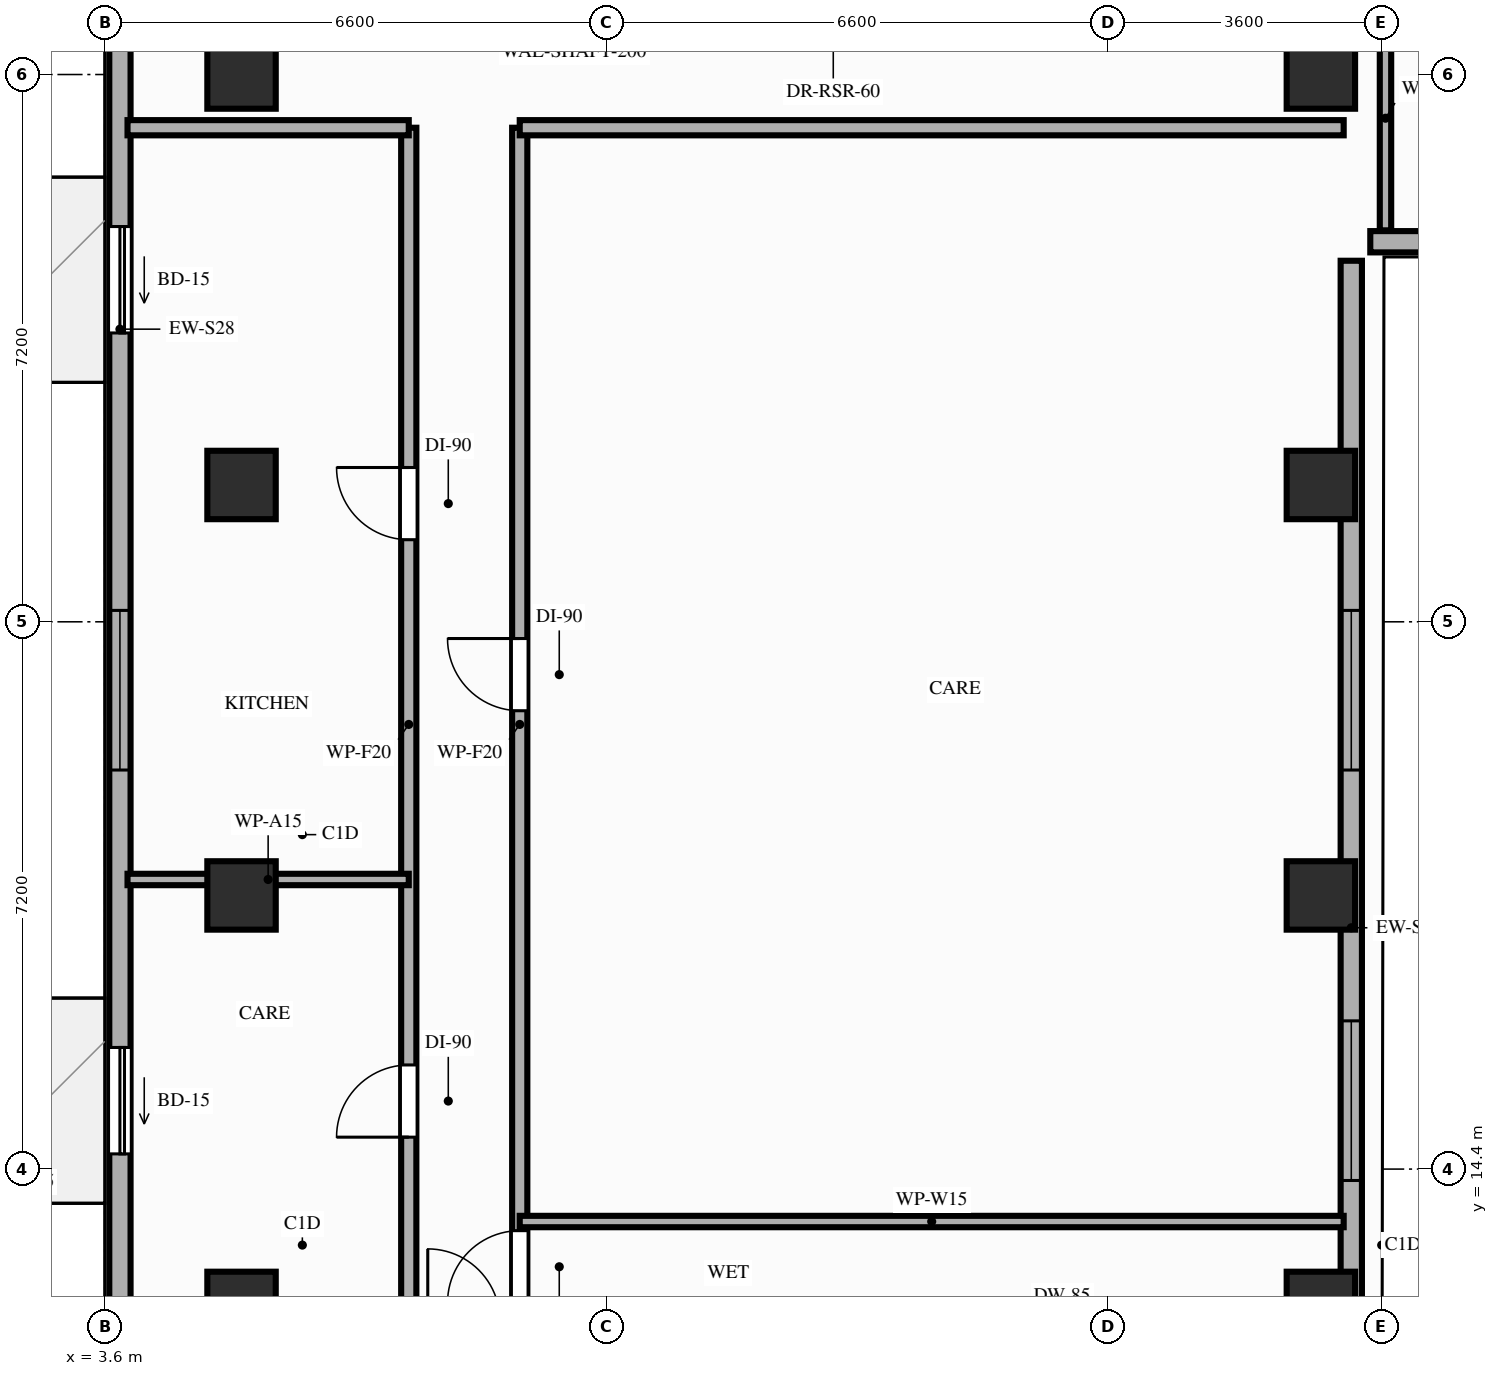
"""IFC4 building model, lengths in metres.
Left out: names, types, materials, properties, quantities, classifications, styles, units other than length and angle.
Written with IfcOpenShell. Run it as: python <this file> out.ifc"""

import sys

from ifc_helpers import new_model, si_unit, direction, frame, frame_2d, origin, origin_2d, place, context, subcontext, project, spatial, rectangle, extrude, element, fill, save


model = new_model("IFC4")
c1 = context("Model", 3, precision=1e-05, world=origin(), true_north=direction((0.0, 1.0)))
c2 = subcontext(c1, "Body", "Model", "MODEL_VIEW")
j1 = project(units=[si_unit("LENGTHUNIT", "METRE"), si_unit("PLANEANGLEUNIT", "RADIAN")], contexts=[c1])
p1 = place(None, origin())
s1 = spatial("IfcSite", under=j1, at=p1, CompositionType="ELEMENT")
p2 = place(p1, origin())
s2 = spatial("IfcBuilding", under=s1, at=p2, CompositionType="ELEMENT")
p3 = place(p2, frame((0.0, 0.0, 192.0)))
s3 = spatial("IfcBuildingStorey", under=s2, at=p3, CompositionType="ELEMENT", Elevation=192.0)
for number, where, z_axis, x_axis in (
    (1, (5.4, 12.6, 0.0), (0.0, 0.0, 1.0), (1.0, 0.0, 0.0)),
    (2, (19.6, 12.6, 0.0), (0.0, 0.0, 1.0), (1.0, 0.0, 0.0)),
    (3, (5.4, 18.0, 0.0), (0.0, 0.0, 1.0), (1.0, 0.0, 0.0)),
    (4, (19.6, 18.0, 0.0), (0.0, 0.0, 1.0), (1.0, 0.0, 0.0)),
    (5, (5.4, 23.4, 0.0), (0.0, 0.0, 1.0), (1.0, 0.0, 0.0)),
    (6, (19.6, 23.4, 0.0), (0.0, 0.0, 1.0), (1.0, 0.0, 0.0)),
    (7, (5.4, 28.8, 0.0), (0.0, 0.0, 1.0), (1.0, 0.0, 0.0)),
    (8, (19.6, 28.8, 0.0), (0.0, 0.0, 1.0), (1.0, 0.0, 0.0)),
):
    element("IfcColumn", number, at=place(p3, frame(where, z_axis=z_axis, x_axis=x_axis)), inside=s3, PredefinedType="COLUMN", context=c2, shape_type="SweptSolid", body=[
        extrude(rectangle(XDim=0.9, YDim=0.9, at=origin_2d()), origin(), (0.0, 0.0, 1.0), 3.2),
    ])
p4 = place(p3, frame((3.8, 42.1, 0.0), z_axis=(0.0, 0.0, 1.0), x_axis=(0.0, -1.0, 0.0)))
e9 = element("IfcWall", 9, at=p4, inside=s3, PredefinedType="STANDARD", context=c2, shape_type="SweptSolid", body=[
    extrude(rectangle(XDim=33.3, YDim=0.28, at=frame_2d((16.65, 0.0))), origin(), (0.0, 0.0, 1.0), 2.71),
])
p5 = place(p4, frame((26.1, 0.0, 0.0)))
e10 = element("IfcOpeningElement", 10, at=p5, cuts=e9, PredefinedType="OPENING", context=c2, shape_type="SweptSolid", body=[
    extrude(rectangle(XDim=1.4, YDim=2.1, at=frame_2d((0.7, 1.05))), frame((0.0, 0.15, 0.0), z_axis=(0.0, -1.0, 0.0), x_axis=(1.0, 0.0, 0.0)), (0.0, 0.0, 1.0), 0.3),
])
p6 = place(p4, frame((15.3, 0.0, 0.0)))
e11 = element("IfcOpeningElement", 11, at=p6, cuts=e9, PredefinedType="OPENING", context=c2, shape_type="SweptSolid", body=[
    extrude(rectangle(XDim=1.4, YDim=2.1, at=frame_2d((0.7, 1.05))), frame((0.0, 0.15, 0.0), z_axis=(0.0, -1.0, 0.0), x_axis=(1.0, 0.0, 0.0)), (0.0, 0.0, 1.0), 0.3),
])
p7 = place(p4, frame((30.38, 0.0, 0.85)))
e12 = element("IfcOpeningElement", 12, at=p7, cuts=e9, PredefinedType="OPENING", context=c2, shape_type="SweptSolid", body=[
    extrude(rectangle(XDim=2.1, YDim=1.61, at=frame_2d((1.05, 0.805))), frame((0.0, 0.15, 0.0), z_axis=(0.0, -1.0, 0.0), x_axis=(1.0, 0.0, 0.0)), (0.0, 0.0, 1.0), 0.3),
])
p8 = place(p4, frame((20.35, 0.0, 0.85)))
e13 = element("IfcOpeningElement", 13, at=p8, cuts=e9, PredefinedType="OPENING", context=c2, shape_type="SweptSolid", body=[
    extrude(rectangle(XDim=2.1, YDim=1.61, at=frame_2d((1.05, 0.805))), frame((0.0, 0.15, 0.0), z_axis=(0.0, -1.0, 0.0), x_axis=(1.0, 0.0, 0.0)), (0.0, 0.0, 1.0), 0.3),
])
p9 = place(p4, frame((9.75, 0.0, 0.85)))
e14 = element("IfcOpeningElement", 14, at=p9, cuts=e9, PredefinedType="OPENING", context=c2, shape_type="SweptSolid", body=[
    extrude(rectangle(XDim=2.1, YDim=1.61, at=frame_2d((1.05, 0.805))), frame((0.0, 0.15, 0.0), z_axis=(0.0, -1.0, 0.0), x_axis=(1.0, 0.0, 0.0)), (0.0, 0.0, 1.0), 0.3),
])
p10 = place(p4, frame((3.65, 0.0, 0.85)))
e15 = element("IfcOpeningElement", 15, at=p10, cuts=e9, PredefinedType="OPENING", context=c2, shape_type="SweptSolid", body=[
    extrude(rectangle(XDim=2.1, YDim=1.61, at=frame_2d((1.05, 0.805))), frame((0.0, 0.15, 0.0), z_axis=(0.0, -1.0, 0.0), x_axis=(1.0, 0.0, 0.0)), (0.0, 0.0, 1.0), 0.3),
])
p11 = place(p3, frame((20.0, 8.8, 0.0), z_axis=(0.0, 0.0, 1.0), x_axis=(0.0, 1.0, 0.0)))
e16 = element("IfcWall", 16, at=p11, inside=s3, PredefinedType="STANDARD", context=c2, shape_type="SweptSolid", body=[
    extrude(rectangle(XDim=17.55, YDim=0.28, at=frame_2d((8.775, 0.0))), origin(), (0.0, 0.0, 1.0), 2.51),
])
p12 = place(p11, frame((1.84, 0.0, 0.85)))
e17 = element("IfcOpeningElement", 17, at=p12, cuts=e16, PredefinedType="OPENING", context=c2, shape_type="SweptSolid", body=[
    extrude(rectangle(XDim=1.1, YDim=1.41, at=frame_2d((0.55, 0.705))), frame((0.0, 0.15, 0.0), z_axis=(0.0, -1.0, 0.0), x_axis=(1.0, 0.0, 0.0)), (0.0, 0.0, 1.0), 0.3),
])
p13 = place(p11, frame((5.45, 0.0, 0.85)))
e18 = element("IfcOpeningElement", 18, at=p13, cuts=e16, PredefinedType="OPENING", context=c2, shape_type="SweptSolid", body=[
    extrude(rectangle(XDim=2.1, YDim=1.41, at=frame_2d((1.05, 0.705))), frame((0.0, 0.15, 0.0), z_axis=(0.0, -1.0, 0.0), x_axis=(1.0, 0.0, 0.0)), (0.0, 0.0, 1.0), 0.3),
])
p14 = place(p11, frame((10.85, 0.0, 0.85)))
e19 = element("IfcOpeningElement", 19, at=p14, cuts=e16, PredefinedType="OPENING", context=c2, shape_type="SweptSolid", body=[
    extrude(rectangle(XDim=2.1, YDim=1.41, at=frame_2d((1.05, 0.705))), frame((0.0, 0.15, 0.0), z_axis=(0.0, -1.0, 0.0), x_axis=(1.0, 0.0, 0.0)), (0.0, 0.0, 1.0), 0.3),
])
p15 = place(p3, frame((20.25, 26.6, 0.0), z_axis=(0.0, 0.0, 1.0), x_axis=(1.0, 0.0, 0.0)))
e20 = element("IfcWall", 20, at=p15, inside=s3, PredefinedType="STANDARD", context=c2, shape_type="SweptSolid", body=[
    extrude(rectangle(XDim=21.35, YDim=0.28, at=frame_2d((10.675, 0.0))), origin(), (0.0, 0.0, 1.0), 2.71),
])
p16 = place(p15, frame((2.5, 0.0, 0.85)))
e21 = element("IfcOpeningElement", 21, at=p16, cuts=e20, PredefinedType="OPENING", context=c2, shape_type="SweptSolid", body=[
    extrude(rectangle(XDim=2.1, YDim=1.61, at=frame_2d((1.05, 0.805))), frame((0.0, 0.15, 0.0), z_axis=(0.0, -1.0, 0.0), x_axis=(1.0, 0.0, 0.0)), (0.0, 0.0, 1.0), 0.3),
])
p17 = place(p15, frame((18.43, 0.0, 0.85)))
e22 = element("IfcOpeningElement", 22, at=p17, cuts=e20, PredefinedType="OPENING", context=c2, shape_type="SweptSolid", body=[
    extrude(rectangle(XDim=2.1, YDim=1.61, at=frame_2d((1.05, 0.805))), frame((0.0, 0.15, 0.0), z_axis=(0.0, -1.0, 0.0), x_axis=(1.0, 0.0, 0.0)), (0.0, 0.0, 1.0), 0.3),
])
p18 = place(p15, frame((7.58, 0.0, 0.85)))
e23 = element("IfcOpeningElement", 23, at=p18, cuts=e20, PredefinedType="OPENING", context=c2, shape_type="SweptSolid", body=[
    extrude(rectangle(XDim=2.1, YDim=1.61, at=frame_2d((1.05, 0.805))), frame((0.0, 0.15, 0.0), z_axis=(0.0, -1.0, 0.0), x_axis=(1.0, 0.0, 0.0)), (0.0, 0.0, 1.0), 0.3),
])
p19 = place(p15, frame((11.54, 0.0, 0.85)))
e24 = element("IfcOpeningElement", 24, at=p19, cuts=e20, PredefinedType="OPENING", context=c2, shape_type="SweptSolid", body=[
    extrude(rectangle(XDim=2.1, YDim=1.61, at=frame_2d((1.05, 0.805))), frame((0.0, 0.15, 0.0), z_axis=(0.0, -1.0, 0.0), x_axis=(1.0, 0.0, 0.0)), (0.0, 0.0, 1.0), 0.3),
])
p20 = place(p15, frame((15.23, 0.0, 0.85)))
e25 = element("IfcOpeningElement", 25, at=p20, cuts=e20, PredefinedType="OPENING", context=c2, shape_type="SweptSolid", body=[
    extrude(rectangle(XDim=2.1, YDim=1.61, at=frame_2d((1.05, 0.805))), frame((0.0, 0.15, 0.0), z_axis=(0.0, -1.0, 0.0), x_axis=(1.0, 0.0, 0.0)), (0.0, 0.0, 1.0), 0.3),
])
p21 = place(p3, frame((7.6, 12.4, 0.0), z_axis=(0.0, 0.0, 1.0), x_axis=(0.0, 1.0, 0.0)))
e26 = element("IfcWall", 26, at=p21, inside=s3, PredefinedType="PARTITIONING", context=c2, shape_type="SweptSolid", body=[
    extrude(rectangle(XDim=15.7, YDim=0.2, at=frame_2d((7.85, 0.0))), origin(), (0.0, 0.0, 1.0), 2.51),
])
p22 = place(p21, frame((2.42, 0.0, 0.0)))
e27 = element("IfcOpeningElement", 27, at=p22, cuts=e26, PredefinedType="OPENING", context=c2, shape_type="SweptSolid", body=[
    extrude(rectangle(XDim=0.95, YDim=2.15, at=frame_2d((0.475, 1.075))), frame((0.0, 0.11, 0.0), z_axis=(0.0, -1.0, 0.0), x_axis=(1.0, 0.0, 0.0)), (0.0, 0.0, 1.0), 0.22),
])
p23 = place(p21, frame((10.28, 0.0, 0.0)))
e28 = element("IfcOpeningElement", 28, at=p23, cuts=e26, PredefinedType="OPENING", context=c2, shape_type="SweptSolid", body=[
    extrude(rectangle(XDim=0.95, YDim=2.15, at=frame_2d((0.475, 1.075))), frame((0.0, 0.11, 0.0), z_axis=(0.0, -1.0, 0.0), x_axis=(1.0, 0.0, 0.0)), (0.0, 0.0, 1.0), 0.22),
])
p24 = place(p3, frame((9.06, 12.4, 0.0), z_axis=(0.0, 0.0, 1.0), x_axis=(0.0, 1.0, 0.0)))
e29 = element("IfcWall", 29, at=p24, inside=s3, PredefinedType="PARTITIONING", context=c2, shape_type="SweptSolid", body=[
    extrude(rectangle(XDim=15.7, YDim=0.2, at=frame_2d((7.85, 0.0))), origin(), (0.0, 0.0, 1.0), 2.51),
])
p25 = place(p24, frame((0.24, 0.0, 0.0)))
e30 = element("IfcOpeningElement", 30, at=p25, cuts=e29, PredefinedType="OPENING", context=c2, shape_type="SweptSolid", body=[
    extrude(rectangle(XDim=0.95, YDim=2.1, at=frame_2d((0.475, 1.05))), frame((0.0, 0.11, 0.0), z_axis=(0.0, -1.0, 0.0), x_axis=(1.0, 0.0, 0.0)), (0.0, 0.0, 1.0), 0.22),
])
p26 = place(p24, frame((8.03, 0.0, 0.0)))
e31 = element("IfcOpeningElement", 31, at=p26, cuts=e29, PredefinedType="OPENING", context=c2, shape_type="SweptSolid", body=[
    extrude(rectangle(XDim=0.95, YDim=2.15, at=frame_2d((0.475, 1.075))), frame((0.0, 0.11, 0.0), z_axis=(0.0, -1.0, 0.0), x_axis=(1.0, 0.0, 0.0)), (0.0, 0.0, 1.0), 0.22),
])
p27 = place(p3, frame((3.9, 28.1, 0.0), z_axis=(0.0, 0.0, 1.0), x_axis=(1.0, 0.0, 0.0)))
e32 = element("IfcWall", 32, at=p27, inside=s3, PredefinedType="PARTITIONING", context=c2, shape_type="SweptSolid", body=[
    extrude(rectangle(XDim=3.7, YDim=0.2, at=frame_2d((1.85, 0.0))), origin(), (0.0, 0.0, 1.0), 2.51),
])
p28 = place(p3, frame((9.06, 28.1, 0.0), z_axis=(0.0, 0.0, 1.0), x_axis=(1.0, 0.0, 0.0)))
e33 = element("IfcWall", 33, at=p28, inside=s3, PredefinedType="PARTITIONING", context=c2, shape_type="SweptSolid", body=[
    extrude(rectangle(XDim=10.84, YDim=0.2, at=frame_2d((5.42, 0.0))), origin(), (0.0, 0.0, 1.0), 2.51),
])
p29 = place(p3, frame((20.45, 26.75, 0.0), z_axis=(0.0, 0.0, 1.0), x_axis=(0.0, 1.0, 0.0)))
e34 = element("IfcWall", 34, at=p29, inside=s3, PredefinedType="PARTITIONING", context=c2, shape_type="SweptSolid", body=[
    extrude(rectangle(XDim=2.95, YDim=0.15, at=frame_2d((1.475, 0.0))), origin(), (0.0, 0.0, 1.0), 2.51),
])
p30 = place(p3, frame((3.9, 18.21, 0.0), z_axis=(0.0, 0.0, 1.0), x_axis=(1.0, 0.0, 0.0)))
e35 = element("IfcWall", 35, at=p30, inside=s3, PredefinedType="PARTITIONING", context=c2, shape_type="SweptSolid", body=[
    extrude(rectangle(XDim=3.7, YDim=0.15, at=frame_2d((1.85, 0.0))), origin(), (0.0, 0.0, 1.0), 2.51),
])
p31 = place(p3, frame((9.06, 13.71, 0.0), z_axis=(0.0, 0.0, 1.0), x_axis=(1.0, 0.0, 0.0)))
e36 = element("IfcWall", 36, at=p31, inside=s3, PredefinedType="PARTITIONING", context=c2, shape_type="SweptSolid", body=[
    extrude(rectangle(XDim=10.84, YDim=0.15, at=frame_2d((5.42, 0.0))), origin(), (0.0, 0.0, 1.0), 2.51),
])
p32 = place(p5, origin())
e37 = element("IfcDoor", 37, at=p32, inside=s3, OperationType="SLIDING_TO_RIGHT", PredefinedType="DOOR", context=c2, shape_type="SweptSolid", body=[
    extrude(rectangle(XDim=1.4, YDim=2.1, at=frame_2d((0.7, 1.05))), frame((0.0, 0.025, 0.0), z_axis=(0.0, -1.0, 0.0), x_axis=(1.0, 0.0, 0.0)), (0.0, 0.0, 1.0), 0.05),
])
fill(e10, e37)
p33 = place(p6, origin())
e38 = element("IfcDoor", 38, at=p33, inside=s3, OperationType="SLIDING_TO_RIGHT", PredefinedType="DOOR", context=c2, shape_type="SweptSolid", body=[
    extrude(rectangle(XDim=1.4, YDim=2.1, at=frame_2d((0.7, 1.05))), frame((0.0, 0.025, 0.0), z_axis=(0.0, -1.0, 0.0), x_axis=(1.0, 0.0, 0.0)), (0.0, 0.0, 1.0), 0.05),
])
fill(e11, e38)
p34 = place(p8, origin())
e39 = element("IfcWindow", 39, at=p34, inside=s3, PartitioningType="SINGLE_PANEL", PredefinedType="WINDOW", context=c2, shape_type="SweptSolid", body=[
    extrude(rectangle(XDim=2.1, YDim=1.61, at=frame_2d((1.05, 0.805))), frame((0.0, 0.03, 0.0), z_axis=(0.0, -1.0, 0.0), x_axis=(1.0, 0.0, 0.0)), (0.0, 0.0, 1.0), 0.06),
])
fill(e13, e39)
p35 = place(p13, origin())
e40 = element("IfcWindow", 40, at=p35, inside=s3, PartitioningType="SINGLE_PANEL", PredefinedType="WINDOW", context=c2, shape_type="SweptSolid", body=[
    extrude(rectangle(XDim=2.1, YDim=1.41, at=frame_2d((1.05, 0.705))), frame((0.0, 0.03, 0.0), z_axis=(0.0, -1.0, 0.0), x_axis=(1.0, 0.0, 0.0)), (0.0, 0.0, 1.0), 0.06),
])
fill(e18, e40)
p36 = place(p14, origin())
e41 = element("IfcWindow", 41, at=p36, inside=s3, PartitioningType="SINGLE_PANEL", PredefinedType="WINDOW", context=c2, shape_type="SweptSolid", body=[
    extrude(rectangle(XDim=2.1, YDim=1.41, at=frame_2d((1.05, 0.705))), frame((0.0, 0.03, 0.0), z_axis=(0.0, -1.0, 0.0), x_axis=(1.0, 0.0, 0.0)), (0.0, 0.0, 1.0), 0.06),
])
fill(e19, e41)
p37 = place(p22, origin())
e42 = element("IfcDoor", 42, at=p37, inside=s3, OperationType="SINGLE_SWING_LEFT", PredefinedType="DOOR", context=c2, shape_type="SweptSolid", body=[
    extrude(rectangle(XDim=0.95, YDim=2.15, at=frame_2d((0.475, 1.075))), frame((0.0, 0.025, 0.0), z_axis=(0.0, -1.0, 0.0), x_axis=(1.0, 0.0, 0.0)), (0.0, 0.0, 1.0), 0.05),
])
fill(e27, e42)
p38 = place(p23, origin())
e43 = element("IfcDoor", 43, at=p38, inside=s3, OperationType="SINGLE_SWING_RIGHT", PredefinedType="DOOR", context=c2, shape_type="SweptSolid", body=[
    extrude(rectangle(XDim=0.95, YDim=2.15, at=frame_2d((0.475, 1.075))), frame((0.0, 0.025, 0.0), z_axis=(0.0, -1.0, 0.0), x_axis=(1.0, 0.0, 0.0)), (0.0, 0.0, 1.0), 0.05),
])
fill(e28, e43)
p39 = place(p25, origin())
e44 = element("IfcDoor", 44, at=p39, inside=s3, OperationType="SINGLE_SWING_LEFT", PredefinedType="DOOR", context=c2, shape_type="SweptSolid", body=[
    extrude(rectangle(XDim=0.95, YDim=2.1, at=frame_2d((0.475, 1.05))), frame((0.0, 0.025, 0.0), z_axis=(0.0, -1.0, 0.0), x_axis=(1.0, 0.0, 0.0)), (0.0, 0.0, 1.0), 0.05),
])
fill(e30, e44)
p40 = place(p26, origin())
e45 = element("IfcDoor", 45, at=p40, inside=s3, OperationType="SINGLE_SWING_RIGHT", PredefinedType="DOOR", context=c2, shape_type="SweptSolid", body=[
    extrude(rectangle(XDim=0.95, YDim=2.15, at=frame_2d((0.475, 1.075))), frame((0.0, 0.025, 0.0), z_axis=(0.0, -1.0, 0.0), x_axis=(1.0, 0.0, 0.0)), (0.0, 0.0, 1.0), 0.05),
])
fill(e31, e45)
save(model, sys.argv[1])
